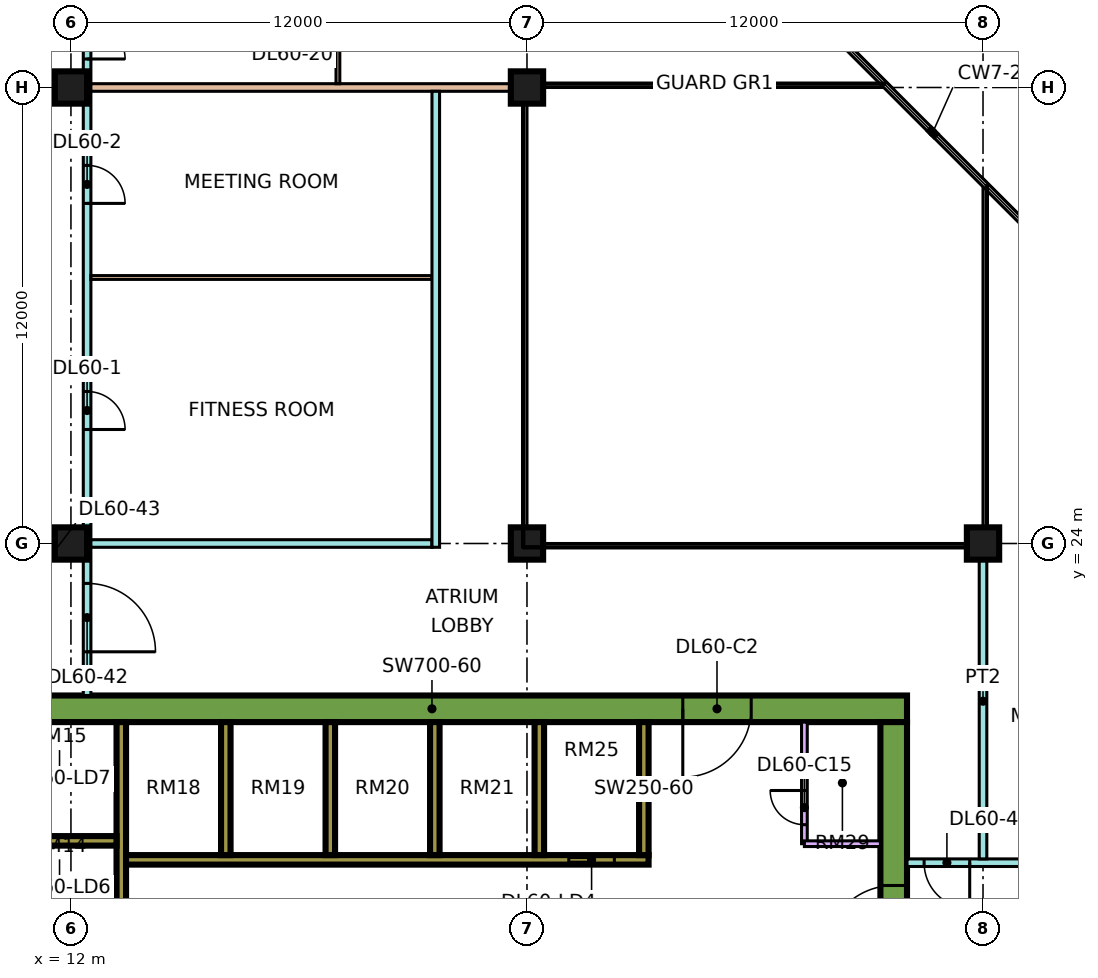
"""IFC4 building model, lengths in metres.
Left out: names, types, materials, properties, quantities, classifications, styles, units other than length and angle.
Written with IfcOpenShell. Run it as: python <this file> out.ifc"""

import sys

from ifc_helpers import new_model, si_unit, direction, frame, frame_2d, origin, origin_2d, place, context, subcontext, project, spatial, rectangle, extrude, element, fill, save


model = new_model("IFC4")
c1 = context("Model", 3, precision=1e-05, world=origin(), true_north=direction((0.0, 1.0)))
c2 = subcontext(c1, "Body", "Model", "MODEL_VIEW")
j1 = project(units=[si_unit("LENGTHUNIT", "METRE"), si_unit("PLANEANGLEUNIT", "RADIAN")], contexts=[c1])
p1 = place(None, origin())
s1 = spatial("IfcSite", under=j1, at=p1, CompositionType="ELEMENT")
p2 = place(p1, origin())
s2 = spatial("IfcBuilding", under=s1, at=p2, CompositionType="ELEMENT")
p3 = place(p2, frame((0.0, 0.0, 252.9)))
s3 = spatial("IfcBuildingStorey", under=s2, at=p3, CompositionType="ELEMENT", Elevation=252.9)
for number, where, z_axis, x_axis in (
    (1, (12.0, 24.0, 0.0), (0.0, 0.0, 1.0), (1.0, 0.0, 0.0)),
    (2, (12.0, 36.0, 0.0), (0.0, 0.0, 1.0), (1.0, 0.0, 0.0)),
    (3, (24.0, 24.0, 0.0), (0.0, 0.0, 1.0), (1.0, 0.0, 0.0)),
    (4, (24.0, 36.0, 0.0), (0.0, 0.0, 1.0), (1.0, 0.0, 0.0)),
    (5, (36.0, 24.0, 0.0), (0.0, 0.0, 1.0), (1.0, 0.0, 0.0)),
):
    element("IfcColumn", number, at=place(p3, frame(where, z_axis=z_axis, x_axis=x_axis)), inside=s3, PredefinedType="COLUMN", context=c2, shape_type="SweptSolid", body=[
        extrude(rectangle(XDim=0.85, YDim=0.85, at=origin_2d()), origin(), (0.0, 0.0, 1.0), 3.75),
    ])
p4 = place(p3, frame((9.0, 19.65, 0.0), z_axis=(0.0, 0.0, 1.0), x_axis=(1.0, 0.0, 0.0)))
e6 = element("IfcWall", 6, at=p4, inside=s3, PredefinedType="SHEAR", context=c2, shape_type="SweptSolid", body=[
    extrude(rectangle(XDim=25.0, YDim=0.7, at=frame_2d((12.5, 0.0))), origin(), (0.0, 0.0, 1.0), 3.75),
])
p5 = place(p4, frame((19.1, 0.0, 0.0)))
e7 = element("IfcOpeningElement", 7, at=p5, cuts=e6, PredefinedType="OPENING", context=c2, shape_type="SweptSolid", body=[
    extrude(rectangle(XDim=1.8, YDim=2.4, at=frame_2d((0.9, 1.2))), frame((0.0, 0.36, 0.0), z_axis=(0.0, -1.0, 0.0), x_axis=(1.0, 0.0, 0.0)), (0.0, 0.0, 1.0), 0.72),
])
p6 = place(p3, frame((33.65, 7.7, 0.0), z_axis=(0.0, 0.0, 1.0), x_axis=(0.0, 1.0, 0.0)))
e8 = element("IfcWall", 8, at=p6, inside=s3, PredefinedType="SHEAR", context=c2, shape_type="SweptSolid", body=[
    extrude(rectangle(XDim=11.6, YDim=0.7, at=frame_2d((5.8, 0.0))), origin(), (0.0, 0.0, 1.0), 3.75),
])
p7 = place(p6, frame((5.5, 0.0, 0.0)))
e9 = element("IfcOpeningElement", 9, at=p7, cuts=e8, PredefinedType="OPENING", context=c2, shape_type="SweptSolid", body=[
    extrude(rectangle(XDim=1.8, YDim=2.4, at=frame_2d((0.9, 1.2))), frame((0.0, 0.36, 0.0), z_axis=(0.0, -1.0, 0.0), x_axis=(1.0, 0.0, 0.0)), (0.0, 0.0, 1.0), 0.72),
])
p8 = place(p3, frame((13.325, 7.7, 0.0), z_axis=(0.0, 0.0, 1.0), x_axis=(0.0, 1.0, 0.0)))
e10 = element("IfcWall", 10, at=p8, inside=s3, PredefinedType="SHEAR", context=c2, shape_type="SweptSolid", body=[
    extrude(rectangle(XDim=11.6, YDim=0.25, at=frame_2d((5.8, 0.0))), origin(), (0.0, 0.0, 1.0), 3.75),
])
p9 = place(p3, frame((13.45, 15.675, 0.0), z_axis=(0.0, 0.0, 1.0), x_axis=(1.0, 0.0, 0.0)))
e11 = element("IfcWall", 11, at=p9, inside=s3, PredefinedType="SHEAR", context=c2, shape_type="SweptSolid", body=[
    extrude(rectangle(XDim=13.75, YDim=0.25, at=frame_2d((6.875, 0.0))), origin(), (0.0, 0.0, 1.0), 3.75),
])
p10 = place(p9, frame((11.65, 0.0, 0.0)))
e12 = element("IfcOpeningElement", 12, at=p10, cuts=e11, PredefinedType="OPENING", context=c2, shape_type="SweptSolid", body=[
    extrude(rectangle(XDim=1.2, YDim=2.2, at=frame_2d((0.6, 1.1))), frame((0.0, 0.135, 0.0), z_axis=(0.0, -1.0, 0.0), x_axis=(1.0, 0.0, 0.0)), (0.0, 0.0, 1.0), 0.27),
])
p11 = place(p3, frame((10.2, 16.175, 0.0), z_axis=(0.0, 0.0, 1.0), x_axis=(1.0, 0.0, 0.0)))
e13 = element("IfcWall", 13, at=p11, inside=s3, PredefinedType="SHEAR", context=c2, shape_type="SweptSolid", body=[
    extrude(rectangle(XDim=3.0, YDim=0.25, at=frame_2d((1.5, 0.0))), origin(), (0.0, 0.0, 1.0), 3.75),
])
for number, where, z_axis, x_axis in (
    (14, (16.075, 15.8, 0.0), (0.0, 0.0, 1.0), (0.0, 1.0, 0.0)),
    (15, (18.825, 15.8, 0.0), (0.0, 0.0, 1.0), (0.0, 1.0, 0.0)),
    (16, (21.575, 15.8, 0.0), (0.0, 0.0, 1.0), (0.0, 1.0, 0.0)),
    (17, (24.325, 15.8, 0.0), (0.0, 0.0, 1.0), (0.0, 1.0, 0.0)),
    (18, (27.075, 15.8, 0.0), (0.0, 0.0, 1.0), (0.0, 1.0, 0.0)),
):
    element("IfcWall", number, at=place(p3, frame(where, z_axis=z_axis, x_axis=x_axis)), inside=s3, PredefinedType="SHEAR", context=c2, shape_type="SweptSolid", body=[
        extrude(rectangle(XDim=3.5, YDim=0.25, at=frame_2d((1.75, 0.0))), origin(), (0.0, 0.0, 1.0), 3.75),
    ])
p12 = place(p3, frame((31.3, 16.1, 0.0), z_axis=(0.0, 0.0, 1.0), x_axis=(0.0, 1.0, 0.0)))
e19 = element("IfcWall", 19, at=p12, inside=s3, PredefinedType="PARTITIONING", context=c2, shape_type="SweptSolid", body=[
    extrude(rectangle(XDim=3.2, YDim=0.15, at=frame_2d((1.6, 0.0))), origin(), (0.0, 0.0, 1.0), 3.3),
])
p13 = place(p12, frame((0.5, 0.0, 0.0)))
e20 = element("IfcOpeningElement", 20, at=p13, cuts=e19, PredefinedType="OPENING", context=c2, shape_type="SweptSolid", body=[
    extrude(rectangle(XDim=0.9, YDim=2.1, at=frame_2d((0.45, 1.05))), frame((0.0, 0.085, 0.0), z_axis=(0.0, -1.0, 0.0), x_axis=(1.0, 0.0, 0.0)), (0.0, 0.0, 1.0), 0.17),
])
p14 = place(p3, frame((31.3, 16.1, 0.0), z_axis=(0.0, 0.0, 1.0), x_axis=(1.0, 0.0, 0.0)))
e21 = element("IfcWall", 21, at=p14, inside=s3, PredefinedType="PARTITIONING", context=c2, shape_type="SweptSolid", body=[
    extrude(rectangle(XDim=2.0, YDim=0.15, at=frame_2d((1.0, 0.0))), origin(), (0.0, 0.0, 1.0), 3.3),
])
p15 = place(p3, frame((12.425, 20.0, 0.0), z_axis=(0.0, 0.0, 1.0), x_axis=(0.0, 1.0, 0.0)))
e22 = element("IfcWall", 22, at=p15, inside=s3, PredefinedType="PARTITIONING", context=c2, shape_type="SweptSolid", body=[
    extrude(rectangle(XDim=42.926, YDim=0.2, at=frame_2d((21.463, 0.0))), origin(), (0.0, 0.0, 1.0), 3.3),
])
p16 = place(p15, frame((7.0, 0.0, 0.0)))
e23 = element("IfcOpeningElement", 23, at=p16, cuts=e22, PredefinedType="OPENING", context=c2, shape_type="SweptSolid", body=[
    extrude(rectangle(XDim=1.0, YDim=2.1, at=frame_2d((0.5, 1.05))), frame((0.0, 0.11, 0.0), z_axis=(0.0, -1.0, 0.0), x_axis=(1.0, 0.0, 0.0)), (0.0, 0.0, 1.0), 0.22),
])
p17 = place(p15, frame((12.95, 0.0, 0.0)))
e24 = element("IfcOpeningElement", 24, at=p17, cuts=e22, PredefinedType="OPENING", context=c2, shape_type="SweptSolid", body=[
    extrude(rectangle(XDim=1.0, YDim=2.1, at=frame_2d((0.5, 1.05))), frame((0.0, 0.11, 0.0), z_axis=(0.0, -1.0, 0.0), x_axis=(1.0, 0.0, 0.0)), (0.0, 0.0, 1.0), 0.22),
])
p18 = place(p15, frame((16.75, 0.0, 0.0)))
e25 = element("IfcOpeningElement", 25, at=p18, cuts=e22, PredefinedType="OPENING", context=c2, shape_type="SweptSolid", body=[
    extrude(rectangle(XDim=1.0, YDim=2.1, at=frame_2d((0.5, 1.05))), frame((0.0, 0.11, 0.0), z_axis=(0.0, -1.0, 0.0), x_axis=(1.0, 0.0, 0.0)), (0.0, 0.0, 1.0), 0.22),
])
p19 = place(p15, frame((34.9, 0.0, 0.0)))
e26 = element("IfcOpeningElement", 26, at=p19, cuts=e22, PredefinedType="OPENING", context=c2, shape_type="SweptSolid", body=[
    extrude(rectangle(XDim=1.0, YDim=2.1, at=frame_2d((0.5, 1.05))), frame((0.0, 0.11, 0.0), z_axis=(0.0, -1.0, 0.0), x_axis=(1.0, 0.0, 0.0)), (0.0, 0.0, 1.0), 0.22),
])
p20 = place(p15, frame((1.15, 0.0, 0.0)))
e27 = element("IfcOpeningElement", 27, at=p20, cuts=e22, PredefinedType="OPENING", context=c2, shape_type="SweptSolid", body=[
    extrude(rectangle(XDim=1.8, YDim=2.1, at=frame_2d((0.9, 1.05))), frame((0.0, 0.11, 0.0), z_axis=(0.0, -1.0, 0.0), x_axis=(1.0, 0.0, 0.0)), (0.0, 0.0, 1.0), 0.22),
])
p21 = place(p15, frame((28.6, 0.0, 0.0)))
e28 = element("IfcOpeningElement", 28, at=p21, cuts=e22, PredefinedType="OPENING", context=c2, shape_type="SweptSolid", body=[
    extrude(rectangle(XDim=1.8, YDim=2.1, at=frame_2d((0.9, 1.05))), frame((0.0, 0.11, 0.0), z_axis=(0.0, -1.0, 0.0), x_axis=(1.0, 0.0, 0.0)), (0.0, 0.0, 1.0), 0.22),
])
p22 = place(p3, frame((12.525, 24.0, 0.0), z_axis=(0.0, 0.0, 1.0), x_axis=(1.0, 0.0, 0.0)))
e29 = element("IfcWall", 29, at=p22, inside=s3, PredefinedType="PARTITIONING", context=c2, shape_type="SweptSolid", body=[
    extrude(rectangle(XDim=8.975, YDim=0.2, at=frame_2d((4.488, 0.0))), origin(), (0.0, 0.0, 1.0), 3.3),
])
p23 = place(p3, frame((12.525, 31.0, 0.0), z_axis=(0.0, 0.0, 1.0), x_axis=(1.0, 0.0, 0.0)))
e30 = element("IfcWall", 30, at=p23, inside=s3, PredefinedType="PARTITIONING", context=c2, shape_type="SweptSolid", body=[
    extrude(rectangle(XDim=8.975, YDim=0.1, at=frame_2d((4.488, 0.0))), origin(), (0.0, 0.0, 1.0), 3.3),
])
p24 = place(p3, frame((12.525, 36.0, 0.0), z_axis=(0.0, 0.0, 1.0), x_axis=(1.0, 0.0, 0.0)))
e31 = element("IfcWall", 31, at=p24, inside=s3, PredefinedType="PARTITIONING", context=c2, shape_type="SweptSolid", body=[
    extrude(rectangle(XDim=11.475, YDim=0.2, at=frame_2d((5.738, 0.0))), origin(), (0.0, 0.0, 1.0), 3.3),
])
p25 = place(p3, frame((19.025, 36.1, 0.0), z_axis=(0.0, 0.0, 1.0), x_axis=(0.0, 1.0, 0.0)))
e32 = element("IfcWall", 32, at=p25, inside=s3, PredefinedType="PARTITIONING", context=c2, shape_type="SweptSolid", body=[
    extrude(rectangle(XDim=2.85, YDim=0.1, at=frame_2d((1.425, 0.0))), origin(), (0.0, 0.0, 1.0), 3.3),
])
p26 = place(p25, frame((0.95, 0.0, 0.0)))
e33 = element("IfcOpeningElement", 33, at=p26, cuts=e32, PredefinedType="OPENING", context=c2, shape_type="SweptSolid", body=[
    extrude(rectangle(XDim=0.9, YDim=2.1, at=frame_2d((0.45, 1.05))), frame((0.0, 0.06, 0.0), z_axis=(0.0, -1.0, 0.0), x_axis=(1.0, 0.0, 0.0)), (0.0, 0.0, 1.0), 0.12),
])
p27 = place(p3, frame((21.6, 23.9, 0.0), z_axis=(0.0, 0.0, 1.0), x_axis=(0.0, 1.0, 0.0)))
e34 = element("IfcWall", 34, at=p27, inside=s3, PredefinedType="PARTITIONING", context=c2, shape_type="SweptSolid", body=[
    extrude(rectangle(XDim=12.0, YDim=0.2, at=frame_2d((6.0, 0.0))), origin(), (0.0, 0.0, 1.0), 3.3),
])
p28 = place(p3, frame((34.0, 15.6, 0.0), z_axis=(0.0, 0.0, 1.0), x_axis=(1.0, 0.0, 0.0)))
e35 = element("IfcWall", 35, at=p28, inside=s3, PredefinedType="PARTITIONING", context=c2, shape_type="SweptSolid", body=[
    extrude(rectangle(XDim=10.35, YDim=0.2, at=frame_2d((5.175, 0.0))), origin(), (0.0, 0.0, 1.0), 3.3),
])
p29 = place(p28, frame((5.6, 0.0, 0.0)))
e36 = element("IfcOpeningElement", 36, at=p29, cuts=e35, PredefinedType="OPENING", context=c2, shape_type="SweptSolid", body=[
    extrude(rectangle(XDim=1.0, YDim=2.1, at=frame_2d((0.5, 1.05))), frame((0.0, 0.11, 0.0), z_axis=(0.0, -1.0, 0.0), x_axis=(1.0, 0.0, 0.0)), (0.0, 0.0, 1.0), 0.22),
])
p30 = place(p28, frame((0.45, 0.0, 0.0)))
e37 = element("IfcOpeningElement", 37, at=p30, cuts=e35, PredefinedType="OPENING", context=c2, shape_type="SweptSolid", body=[
    extrude(rectangle(XDim=1.2, YDim=2.1, at=frame_2d((0.6, 1.05))), frame((0.0, 0.11, 0.0), z_axis=(0.0, -1.0, 0.0), x_axis=(1.0, 0.0, 0.0)), (0.0, 0.0, 1.0), 0.22),
])
p31 = place(p3, frame((36.0, 15.7, 0.0), z_axis=(0.0, 0.0, 1.0), x_axis=(0.0, 1.0, 0.0)))
e38 = element("IfcWall", 38, at=p31, inside=s3, PredefinedType="PARTITIONING", context=c2, shape_type="SweptSolid", body=[
    extrude(rectangle(XDim=8.3, YDim=0.2, at=frame_2d((4.15, 0.0))), origin(), (0.0, 0.0, 1.0), 3.3),
])
p32 = place(p10, origin())
e39 = element("IfcDoor", 39, at=p32, inside=s3, OperationType="DOUBLE_DOOR_SLIDING", PredefinedType="DOOR", context=c2, shape_type="SweptSolid", body=[
    extrude(rectangle(XDim=1.2, YDim=2.2, at=frame_2d((0.6, 1.1))), frame((0.0, 0.025, 0.0), z_axis=(0.0, -1.0, 0.0), x_axis=(1.0, 0.0, 0.0)), (0.0, 0.0, 1.0), 0.05),
])
fill(e12, e39)
p33 = place(p7, origin())
e40 = element("IfcDoor", 40, at=p33, inside=s3, OperationType="DOUBLE_DOOR_SINGLE_SWING", PredefinedType="DOOR", context=c2, shape_type="SweptSolid", body=[
    extrude(rectangle(XDim=1.8, YDim=2.4, at=frame_2d((0.9, 1.2))), frame((0.0, 0.025, 0.0), z_axis=(0.0, -1.0, 0.0), x_axis=(1.0, 0.0, 0.0)), (0.0, 0.0, 1.0), 0.05),
])
fill(e9, e40)
p34 = place(p5, frame((1.8, 0.0, 0.0), z_axis=(0.0, 0.0, 1.0), x_axis=(-1.0, 0.0, 0.0)))
e41 = element("IfcDoor", 41, at=p34, inside=s3, OperationType="DOUBLE_DOOR_SINGLE_SWING", PredefinedType="DOOR", context=c2, shape_type="SweptSolid", body=[
    extrude(rectangle(XDim=1.8, YDim=2.4, at=frame_2d((0.9, 1.2))), frame((0.0, 0.025, 0.0), z_axis=(0.0, -1.0, 0.0), x_axis=(1.0, 0.0, 0.0)), (0.0, 0.0, 1.0), 0.05),
])
fill(e7, e41)
p35 = place(p13, frame((0.9, 0.0, 0.0), z_axis=(0.0, 0.0, 1.0), x_axis=(-1.0, 0.0, 0.0)))
e42 = element("IfcDoor", 42, at=p35, inside=s3, OperationType="SINGLE_SWING_RIGHT", PredefinedType="DOOR", context=c2, shape_type="SweptSolid", body=[
    extrude(rectangle(XDim=0.9, YDim=2.1, at=frame_2d((0.45, 1.05))), frame((0.0, 0.025, 0.0), z_axis=(0.0, -1.0, 0.0), x_axis=(1.0, 0.0, 0.0)), (0.0, 0.0, 1.0), 0.05),
])
fill(e20, e42)
p36 = place(p16, frame((1.0, 0.0, 0.0), z_axis=(0.0, 0.0, 1.0), x_axis=(-1.0, 0.0, 0.0)))
e43 = element("IfcDoor", 43, at=p36, inside=s3, OperationType="SINGLE_SWING_LEFT", PredefinedType="DOOR", context=c2, shape_type="SweptSolid", body=[
    extrude(rectangle(XDim=1.0, YDim=2.1, at=frame_2d((0.5, 1.05))), frame((0.0, 0.025, 0.0), z_axis=(0.0, -1.0, 0.0), x_axis=(1.0, 0.0, 0.0)), (0.0, 0.0, 1.0), 0.05),
])
fill(e23, e43)
p37 = place(p17, frame((1.0, 0.0, 0.0), z_axis=(0.0, 0.0, 1.0), x_axis=(-1.0, 0.0, 0.0)))
e44 = element("IfcDoor", 44, at=p37, inside=s3, OperationType="SINGLE_SWING_LEFT", PredefinedType="DOOR", context=c2, shape_type="SweptSolid", body=[
    extrude(rectangle(XDim=1.0, YDim=2.1, at=frame_2d((0.5, 1.05))), frame((0.0, 0.025, 0.0), z_axis=(0.0, -1.0, 0.0), x_axis=(1.0, 0.0, 0.0)), (0.0, 0.0, 1.0), 0.05),
])
fill(e24, e44)
p38 = place(p18, frame((1.0, 0.0, 0.0), z_axis=(0.0, 0.0, 1.0), x_axis=(-1.0, 0.0, 0.0)))
e45 = element("IfcDoor", 45, at=p38, inside=s3, OperationType="SINGLE_SWING_LEFT", PredefinedType="DOOR", context=c2, shape_type="SweptSolid", body=[
    extrude(rectangle(XDim=1.0, YDim=2.1, at=frame_2d((0.5, 1.05))), frame((0.0, 0.025, 0.0), z_axis=(0.0, -1.0, 0.0), x_axis=(1.0, 0.0, 0.0)), (0.0, 0.0, 1.0), 0.05),
])
fill(e25, e45)
p39 = place(p30, origin())
e46 = element("IfcDoor", 46, at=p39, inside=s3, OperationType="SINGLE_SWING_RIGHT", PredefinedType="DOOR", context=c2, shape_type="SweptSolid", body=[
    extrude(rectangle(XDim=1.2, YDim=2.1, at=frame_2d((0.6, 1.05))), frame((0.0, 0.025, 0.0), z_axis=(0.0, -1.0, 0.0), x_axis=(1.0, 0.0, 0.0)), (0.0, 0.0, 1.0), 0.05),
])
fill(e37, e46)
p40 = place(p20, frame((1.8, 0.0, 0.0), z_axis=(0.0, 0.0, 1.0), x_axis=(-1.0, 0.0, 0.0)))
e47 = element("IfcDoor", 47, at=p40, inside=s3, OperationType="DOUBLE_DOOR_SINGLE_SWING", PredefinedType="DOOR", context=c2, shape_type="SweptSolid", body=[
    extrude(rectangle(XDim=1.8, YDim=2.1, at=frame_2d((0.9, 1.05))), frame((0.0, 0.025, 0.0), z_axis=(0.0, -1.0, 0.0), x_axis=(1.0, 0.0, 0.0)), (0.0, 0.0, 1.0), 0.05),
])
fill(e27, e47)
save(model, sys.argv[1])
